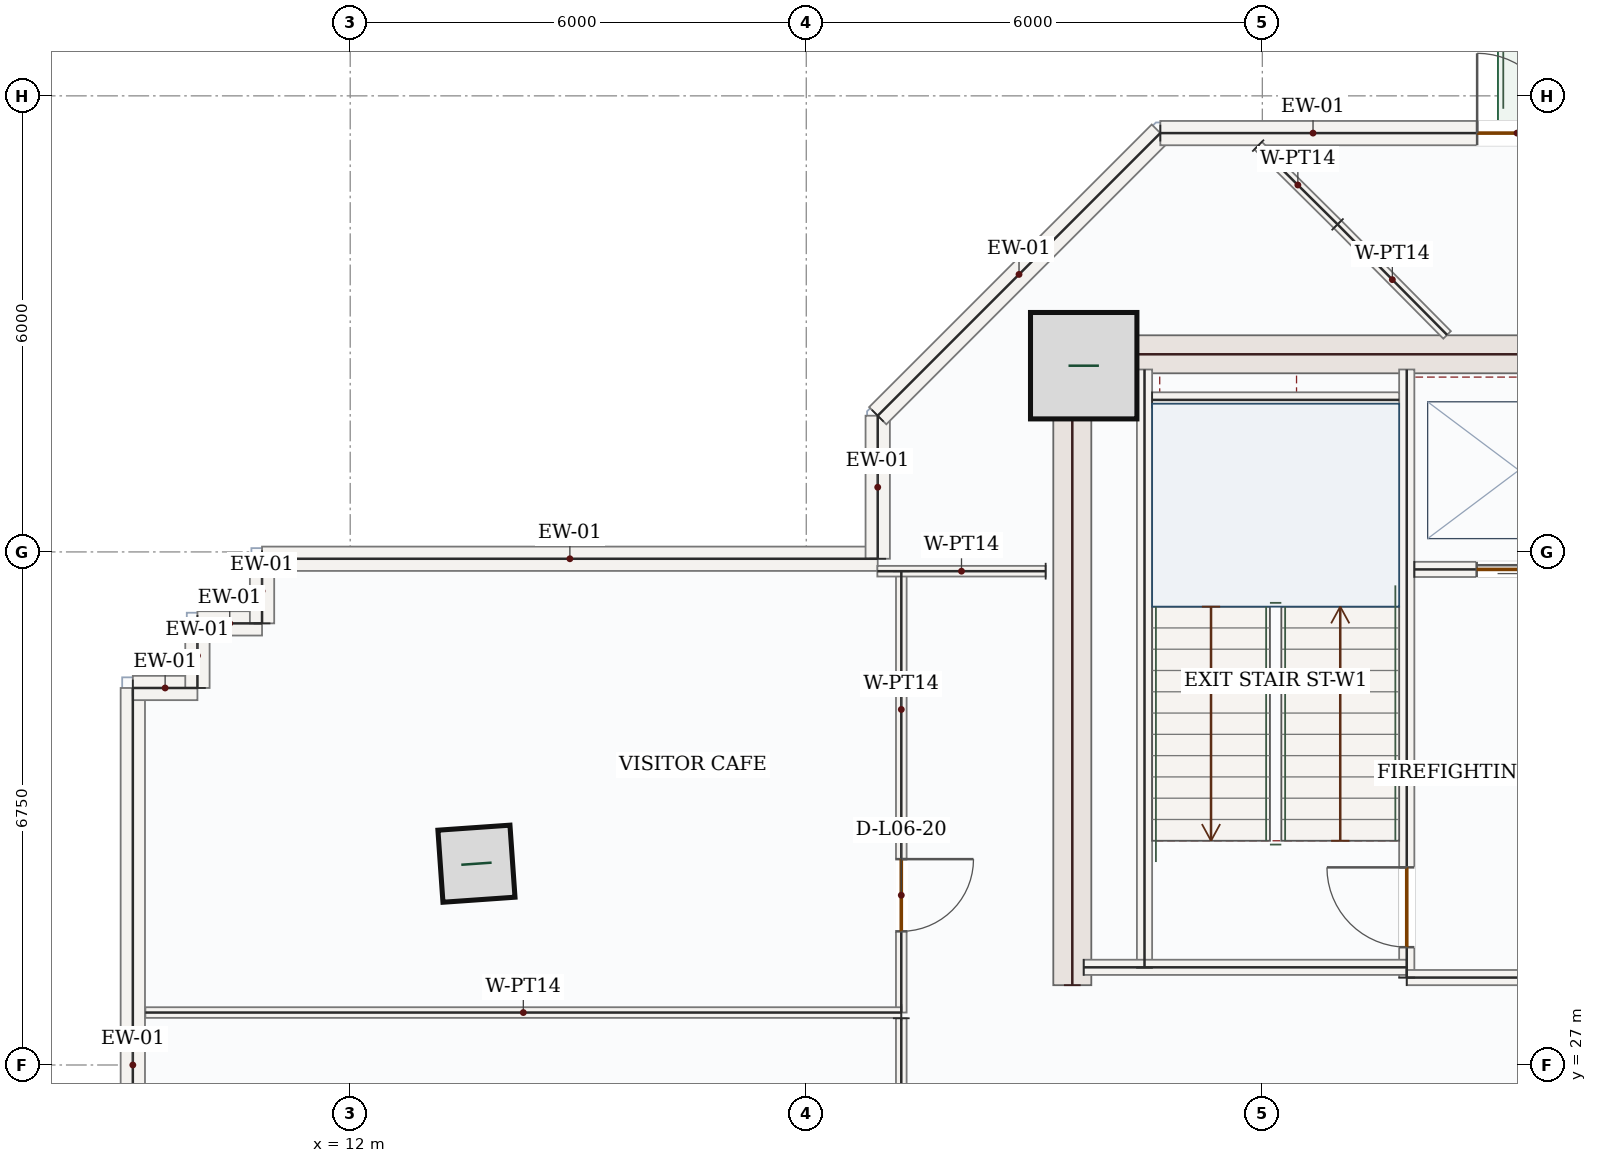
"""IFC4 building model, lengths in metres.
Left out: names, types, materials, properties, quantities, classifications, styles, units other than length and angle.
Written with IfcOpenShell. Run it as: python <this file> out.ifc"""

import sys

from ifc_helpers import new_model, si_unit, direction, frame, frame_2d, origin, origin_2d, place, context, subcontext, project, spatial, rectangle, hollow_rectangle, extrude, source, transform, mapped, element, fill, save


model = new_model("IFC4")
c1 = context("Model", 3, precision=1e-05, world=origin(), true_north=direction((0.0, 1.0)))
c2 = subcontext(c1, "Body", "Model", "MODEL_VIEW")
j1 = project(units=[si_unit("LENGTHUNIT", "METRE"), si_unit("PLANEANGLEUNIT", "RADIAN")], contexts=[c1])
p1 = place(None, origin())
s1 = spatial("IfcSite", under=j1, at=p1, CompositionType="ELEMENT")
p2 = place(p1, origin())
s2 = spatial("IfcBuilding", under=s1, at=p2, CompositionType="ELEMENT")
p3 = place(p2, frame((0.0, 0.0, 33.3)))
s3 = spatial("IfcBuildingStorey", under=s2, at=p3, CompositionType="ELEMENT", Elevation=33.3)
m1 = source(origin(), c2, "Body", "SweptSolid", [
    extrude(rectangle(XDim=8.55, YDim=0.5, at=frame_2d((4.275, 0.0))), origin(), (0.0, 0.0, 1.0), 3.95),
])
p4 = place(p3, frame((21.5, 28.05, 0.0), z_axis=(0.0, 0.0, 1.0), x_axis=(0.0, 1.0, 0.0)))
e1 = element("IfcWall", 1, at=p4, inside=s3, PredefinedType="SHEAR", context=c2, shape_type="MappedRepresentation", body=[
    mapped(m1, transform((0.0, 0.0, 0.0), x_axis=(1.0, 0.0, 0.0), y_axis=(0.0, 1.0, 0.0), z_axis=(0.0, 0.0, 1.0), scale=1.0)),
])
m2 = source(origin(), c2, "Body", "SweptSolid", [
    extrude(rectangle(XDim=7.0, YDim=0.5, at=frame_2d((3.5, 0.0))), origin(), (0.0, 0.0, 1.0), 3.95),
])
p5 = place(p3, frame((21.75, 36.35, 0.0), z_axis=(0.0, 0.0, 1.0), x_axis=(1.0, 0.0, 0.0)))
e2 = element("IfcWall", 2, at=p5, inside=s3, PredefinedType="SHEAR", context=c2, shape_type="MappedRepresentation", body=[
    mapped(m2, transform((0.0, 0.0, 0.0), x_axis=(1.0, 0.0, 0.0), y_axis=(0.0, 1.0, 0.0), z_axis=(0.0, 0.0, 1.0), scale=1.0)),
])
m3 = source(origin(), c2, "Body", "SweptSolid", [
    extrude(rectangle(XDim=1.4, YDim=1.4, at=origin_2d()), origin(), (0.0, 0.0, 1.0), 4.2),
])
p6 = place(p3, frame((21.65, 36.2, 0.0), z_axis=(0.0, 0.0, 1.0), x_axis=(1.0, 0.0, 0.0)))
e3 = element("IfcColumn", 3, at=p6, inside=s3, PredefinedType="COLUMN", context=c2, shape_type="MappedRepresentation", body=[
    mapped(m3, transform((0.0, 0.0, 0.0), x_axis=(1.0, 0.0, 0.0), y_axis=(0.0, 1.0, 0.0), z_axis=(0.0, 0.0, 1.0), scale=1.0)),
])
m4 = source(origin(), c2, "Body", "SweptSolid", [
    extrude(hollow_rectangle(XDim=0.95, YDim=0.95, WallThickness=0.05, at=origin_2d()), origin(), (0.0, 0.0, 1.0), 4.2),
])
p7 = place(p3, frame((13.661, 29.648, 0.0), z_axis=(0.0, 0.0, 1.0), x_axis=(0.99756405026, 0.069756473744, 0.0)))
e4 = element("IfcColumn", 4, at=p7, inside=s3, PredefinedType="COLUMN", context=c2, shape_type="MappedRepresentation", body=[
    mapped(m4, transform((0.0, 0.0, 0.0), x_axis=(1.0, 0.0, 0.0), y_axis=(0.0, 1.0, 0.0), z_axis=(0.0, 0.0, 1.0), scale=1.0)),
])
m5 = source(origin(), c2, "Body", "SweptSolid", [
    extrude(rectangle(XDim=9.92, YDim=0.32, at=frame_2d((4.96, 0.0))), origin(), (0.0, 0.0, 1.0), 3.95),
])
p8 = place(p3, frame((9.14, 22.04, 0.0), z_axis=(0.0, 0.0, 1.0), x_axis=(0.0, 1.0, 0.0)))
e5 = element("IfcWall", 5, at=p8, inside=s3, PredefinedType="SOLIDWALL", context=c2, shape_type="MappedRepresentation", body=[
    mapped(m5, transform((0.0, 0.0, 0.0), x_axis=(1.0, 0.0, 0.0), y_axis=(0.0, 1.0, 0.0), z_axis=(0.0, 0.0, 1.0), scale=1.0)),
])
m6 = source(origin(), c2, "Body", "SweptSolid", [
    extrude(rectangle(XDim=0.85, YDim=0.32, at=frame_2d((0.425, 0.0))), origin(), (0.0, 0.0, 1.0), 3.95),
])
for number, where, z_axis, x_axis in (
    (6, (9.14, 31.96, 0.0), (0.0, 0.0, 1.0), (1.0, 0.0, 0.0)),
    (7, (9.99, 31.96, 0.0), (0.0, 0.0, 1.0), (0.0, 1.0, 0.0)),
    (8, (9.99, 32.81, 0.0), (0.0, 0.0, 1.0), (1.0, 0.0, 0.0)),
):
    element("IfcWall", number, at=place(p3, frame(where, z_axis=z_axis, x_axis=x_axis)), inside=s3, PredefinedType="SOLIDWALL", context=c2, shape_type="MappedRepresentation", body=[
        mapped(m6, transform((0.0, 0.0, 0.0), x_axis=(1.0, 0.0, 0.0), y_axis=(0.0, 1.0, 0.0), z_axis=(0.0, 0.0, 1.0), scale=1.0)),
    ])
m7 = source(origin(), c2, "Body", "SweptSolid", [
    extrude(rectangle(XDim=0.85, YDim=0.32, at=frame_2d((0.425, 0.0))), origin(), (0.0, 0.0, 1.0), 3.95),
])
p9 = place(p3, frame((10.84, 32.81, 0.0), z_axis=(0.0, 0.0, 1.0), x_axis=(0.0, 1.0, 0.0)))
e9 = element("IfcWall", 9, at=p9, inside=s3, PredefinedType="SOLIDWALL", context=c2, shape_type="MappedRepresentation", body=[
    mapped(m7, transform((0.0, 0.0, 0.0), x_axis=(1.0, 0.0, 0.0), y_axis=(0.0, 1.0, 0.0), z_axis=(0.0, 0.0, 1.0), scale=1.0)),
])
m8 = source(origin(), c2, "Body", "SweptSolid", [
    extrude(rectangle(XDim=8.1, YDim=0.32, at=frame_2d((4.05, 0.0))), origin(), (0.0, 0.0, 1.0), 3.95),
])
p10 = place(p3, frame((10.84, 33.66, 0.0), z_axis=(0.0, 0.0, 1.0), x_axis=(1.0, 0.0, 0.0)))
e10 = element("IfcWall", 10, at=p10, inside=s3, PredefinedType="SOLIDWALL", context=c2, shape_type="MappedRepresentation", body=[
    mapped(m8, transform((0.0, 0.0, 0.0), x_axis=(1.0, 0.0, 0.0), y_axis=(0.0, 1.0, 0.0), z_axis=(0.0, 0.0, 1.0), scale=1.0)),
])
m9 = source(origin(), c2, "Body", "SweptSolid", [
    extrude(rectangle(XDim=1.882, YDim=0.32, at=frame_2d((0.941, 0.0))), origin(), (0.0, 0.0, 1.0), 3.95),
])
p11 = place(p3, frame((18.94, 33.66, 0.0), z_axis=(0.0, 0.0, 1.0), x_axis=(0.0, 1.0, 0.0)))
e11 = element("IfcWall", 11, at=p11, inside=s3, PredefinedType="SOLIDWALL", context=c2, shape_type="MappedRepresentation", body=[
    mapped(m9, transform((0.0, 0.0, 0.0), x_axis=(1.0, 0.0, 0.0), y_axis=(0.0, 1.0, 0.0), z_axis=(0.0, 0.0, 1.0), scale=1.0)),
])
m10 = source(origin(), c2, "Body", "SweptSolid", [
    extrude(rectangle(XDim=5.258, YDim=0.32, at=frame_2d((2.629, 0.0))), origin(), (0.0, 0.0, 1.0), 3.95),
])
p12 = place(p3, frame((18.94, 35.542, 0.0), z_axis=(0.0, 0.0, 1.0), x_axis=(0.707106781187, 0.707106781187, 0.0)))
e12 = element("IfcWall", 12, at=p12, inside=s3, PredefinedType="SOLIDWALL", context=c2, shape_type="MappedRepresentation", body=[
    mapped(m10, transform((0.0, 0.0, 0.0), x_axis=(1.0, 0.0, 0.0), y_axis=(0.0, 1.0, 0.0), z_axis=(0.0, 0.0, 1.0), scale=1.0)),
])
p13 = place(p3, frame((22.658, 39.26, 0.0), z_axis=(0.0, 0.0, 1.0), x_axis=(1.0, 0.0, 0.0)))
e13 = element("IfcWall", 13, at=p13, inside=s3, PredefinedType="SOLIDWALL", context=c2, shape_type="SweptSolid", body=[
    extrude(rectangle(XDim=6.682, YDim=0.32, at=frame_2d((3.341, 0.0))), origin(), (0.0, 0.0, 1.0), 3.95),
])
p14 = place(p13, frame((4.168, 0.0, 0.0)))
e14 = element("IfcOpeningElement", 14, at=p14, cuts=e13, PredefinedType="OPENING", context=c2, shape_type="SweptSolid", body=[
    extrude(rectangle(XDim=1.05, YDim=2.15, at=frame_2d((0.525, 1.075))), frame((0.0, 0.17, 0.0), z_axis=(0.0, -1.0, 0.0), x_axis=(1.0, 0.0, 0.0)), (0.0, 0.0, 1.0), 0.34),
])
m11 = source(origin(), c2, "Body", "SweptSolid", [
    extrude(rectangle(XDim=7.87, YDim=0.2, at=frame_2d((3.935, 0.0))), origin(), (0.0, 0.0, 1.0), 3.95),
])
p15 = place(p3, frame((22.45, 28.28, 0.0), z_axis=(0.0, 0.0, 1.0), x_axis=(0.0, 1.0, 0.0)))
e15 = element("IfcWall", 15, at=p15, inside=s3, PredefinedType="SOLIDWALL", context=c2, shape_type="MappedRepresentation", body=[
    mapped(m11, transform((0.0, 0.0, 0.0), x_axis=(1.0, 0.0, 0.0), y_axis=(0.0, 1.0, 0.0), z_axis=(0.0, 0.0, 1.0), scale=1.0)),
])
p16 = place(p3, frame((25.9, 28.15, 0.0), z_axis=(0.0, 0.0, 1.0), x_axis=(0.0, 1.0, 0.0)))
e16 = element("IfcWall", 16, at=p16, inside=s3, PredefinedType="SOLIDWALL", context=c2, shape_type="SweptSolid", body=[
    extrude(rectangle(XDim=8.0, YDim=0.2, at=frame_2d((4.0, 0.0))), origin(), (0.0, 0.0, 1.0), 3.95),
])
p17 = place(p16, frame((0.4, 0.0, 0.0)))
e17 = element("IfcOpeningElement", 17, at=p17, cuts=e16, PredefinedType="OPENING", context=c2, shape_type="SweptSolid", body=[
    extrude(rectangle(XDim=1.05, YDim=2.15, at=frame_2d((0.525, 1.075))), frame((0.0, 0.11, 0.0), z_axis=(0.0, -1.0, 0.0), x_axis=(1.0, 0.0, 0.0)), (0.0, 0.0, 1.0), 0.22),
])
m12 = source(origin(), c2, "Body", "SweptSolid", [
    extrude(rectangle(XDim=4.25, YDim=0.2, at=frame_2d((2.125, 0.0))), origin(), (0.0, 0.0, 1.0), 3.95),
])
p18 = place(p3, frame((21.65, 28.285, 0.0), z_axis=(0.0, 0.0, 1.0), x_axis=(1.0, 0.0, 0.0)))
e18 = element("IfcWall", 18, at=p18, inside=s3, PredefinedType="SOLIDWALL", context=c2, shape_type="MappedRepresentation", body=[
    mapped(m12, transform((0.0, 0.0, 0.0), x_axis=(1.0, 0.0, 0.0), y_axis=(0.0, 1.0, 0.0), z_axis=(0.0, 0.0, 1.0), scale=1.0)),
])
m13 = source(origin(), c2, "Body", "SweptSolid", [
    extrude(rectangle(XDim=3.0, YDim=0.2, at=frame_2d((1.5, 0.0))), origin(), (0.0, 0.0, 1.0), 3.95),
])
p19 = place(p3, frame((25.9, 28.15, 0.0), z_axis=(0.0, 0.0, 1.0), x_axis=(1.0, 0.0, 0.0)))
e19 = element("IfcWall", 19, at=p19, inside=s3, PredefinedType="SOLIDWALL", context=c2, shape_type="MappedRepresentation", body=[
    mapped(m13, transform((0.0, 0.0, 0.0), x_axis=(1.0, 0.0, 0.0), y_axis=(0.0, 1.0, 0.0), z_axis=(0.0, 0.0, 1.0), scale=1.0)),
])
m14 = source(origin(), c2, "Body", "SweptSolid", [
    extrude(rectangle(XDim=3.25, YDim=0.2, at=frame_2d((1.625, 0.0))), origin(), (0.0, 0.0, 1.0), 3.95),
])
p20 = place(p3, frame((22.55, 35.75, 0.0), z_axis=(0.0, 0.0, 1.0), x_axis=(1.0, 0.0, 0.0)))
e20 = element("IfcWall", 20, at=p20, inside=s3, PredefinedType="SOLIDWALL", context=c2, shape_type="MappedRepresentation", body=[
    mapped(m14, transform((0.0, 0.0, 0.0), x_axis=(1.0, 0.0, 0.0), y_axis=(0.0, 1.0, 0.0), z_axis=(0.0, 0.0, 1.0), scale=1.0)),
])
p21 = place(p3, frame((26.0, 33.52, 0.0), z_axis=(0.0, 0.0, 1.0), x_axis=(1.0, 0.0, 0.0)))
e21 = element("IfcWall", 21, at=p21, inside=s3, PredefinedType="SOLIDWALL", context=c2, shape_type="SweptSolid", body=[
    extrude(rectangle(XDim=2.75, YDim=0.2, at=frame_2d((1.375, 0.0))), origin(), (0.0, 0.0, 1.0), 3.95),
])
p22 = place(p21, frame((0.82, 0.0, 0.0)))
e22 = element("IfcOpeningElement", 22, at=p22, cuts=e21, PredefinedType="OPENING", context=c2, shape_type="SweptSolid", body=[
    extrude(rectangle(XDim=1.1, YDim=2.15, at=frame_2d((0.55, 1.075))), frame((0.0, 0.11, 0.0), z_axis=(0.0, -1.0, 0.0), x_axis=(1.0, 0.0, 0.0)), (0.0, 0.0, 1.0), 0.22),
])
p23 = place(p3, frame((19.25, 33.496, 0.0), z_axis=(0.0, 0.0, 1.0), x_axis=(-8.409368e-05, -0.999999996464, 0.0)))
e23 = element("IfcWall", 23, at=p23, inside=s3, PredefinedType="PARTITIONING", context=c2, shape_type="SweptSolid", body=[
    extrude(rectangle(XDim=5.806, YDim=0.14, at=frame_2d((2.903, 0.0))), origin(), (0.0, 0.0, 1.0), 3.95),
])
p24 = place(p23, frame((3.788, 0.0, 0.0)))
e24 = element("IfcOpeningElement", 24, at=p24, cuts=e23, PredefinedType="OPENING", context=c2, shape_type="SweptSolid", body=[
    extrude(rectangle(XDim=0.95, YDim=2.15, at=frame_2d((0.475, 1.075))), frame((0.0, 0.08, 0.0), z_axis=(0.0, -1.0, 0.0), x_axis=(1.0, 0.0, 0.0)), (0.0, 0.0, 1.0), 0.16),
])
m15 = source(origin(), c2, "Body", "SweptSolid", [
    extrude(rectangle(XDim=9.945, YDim=0.14, at=frame_2d((4.973, 0.0))), origin(), (0.0, 0.0, 1.0), 3.95),
])
p25 = place(p3, frame((19.25, 27.69, 0.0), z_axis=(0.0, 0.0, 1.0), x_axis=(-1.0, 0.0, 0.0)))
e25 = element("IfcWall", 25, at=p25, inside=s3, PredefinedType="PARTITIONING", context=c2, shape_type="MappedRepresentation", body=[
    mapped(m15, transform((0.0, 0.0, 0.0), x_axis=(1.0, 0.0, 0.0), y_axis=(0.0, 1.0, 0.0), z_axis=(0.0, 0.0, 1.0), scale=1.0)),
])
m16 = source(origin(), c2, "Body", "SweptSolid", [
    extrude(rectangle(XDim=1.471, YDim=0.14, at=frame_2d((0.736, 0.0))), origin(), (0.0, 0.0, 1.0), 3.95),
])
p26 = place(p3, frame((23.945, 39.095, 0.0), z_axis=(0.0, 0.0, 1.0), x_axis=(0.710417151562, -0.703780840011, 0.0)))
e26 = element("IfcWall", 26, at=p26, inside=s3, PredefinedType="PARTITIONING", context=c2, shape_type="MappedRepresentation", body=[
    mapped(m16, transform((0.0, 0.0, 0.0), x_axis=(1.0, 0.0, 0.0), y_axis=(0.0, 1.0, 0.0), z_axis=(0.0, 0.0, 1.0), scale=1.0)),
])
m17 = source(origin(), c2, "Body", "SweptSolid", [
    extrude(rectangle(XDim=2.047, YDim=0.14, at=frame_2d((1.024, 0.0))), origin(), (0.0, 0.0, 1.0), 3.95),
])
p27 = place(p3, frame((24.99, 38.059, 0.0), z_axis=(0.0, 0.0, 1.0), x_axis=(0.703819772346, -0.710378580797, 0.0)))
e27 = element("IfcWall", 27, at=p27, inside=s3, PredefinedType="PARTITIONING", context=c2, shape_type="MappedRepresentation", body=[
    mapped(m17, transform((0.0, 0.0, 0.0), x_axis=(1.0, 0.0, 0.0), y_axis=(0.0, 1.0, 0.0), z_axis=(0.0, 0.0, 1.0), scale=1.0)),
])
m18 = source(origin(), c2, "Body", "SweptSolid", [
    extrude(rectangle(XDim=2.214, YDim=0.14, at=frame_2d((1.107, 0.0))), origin(), (0.0, 0.0, 1.0), 3.95),
])
p28 = place(p3, frame((21.149, 33.497, 0.0), z_axis=(0.0, 0.0, 1.0), x_axis=(-0.999999993922, -0.000110253583, 0.0)))
e28 = element("IfcWall", 28, at=p28, inside=s3, PredefinedType="PARTITIONING", context=c2, shape_type="MappedRepresentation", body=[
    mapped(m18, transform((0.0, 0.0, 0.0), x_axis=(1.0, 0.0, 0.0), y_axis=(0.0, 1.0, 0.0), z_axis=(0.0, 0.0, 1.0), scale=1.0)),
])
p29 = place(p3, frame((19.25, 27.615, 0.0), z_axis=(0.0, 0.0, 1.0), x_axis=(0.0, -1.0, 0.0)))
e29 = element("IfcWall", 29, at=p29, inside=s3, PredefinedType="PARTITIONING", context=c2, shape_type="SweptSolid", body=[
    extrude(rectangle(XDim=7.109, YDim=0.14, at=frame_2d((3.555, 0.0))), origin(), (0.0, 0.0, 1.0), 3.95),
])
p30 = place(p29, frame((2.156, 0.0, 0.0)))
e30 = element("IfcOpeningElement", 30, at=p30, cuts=e29, PredefinedType="OPENING", context=c2, shape_type="SweptSolid", body=[
    extrude(rectangle(XDim=0.95, YDim=2.15, at=frame_2d((0.475, 1.075))), frame((0.0, 0.08, 0.0), z_axis=(0.0, -1.0, 0.0), x_axis=(1.0, 0.0, 0.0)), (0.0, 0.0, 1.0), 0.16),
])
m19 = source(origin(), c2, "Body", "SweptSolid", [
    extrude(rectangle(XDim=1.05, YDim=2.15, at=frame_2d((0.525, 1.075))), frame((0.0, 0.025, 0.0), z_axis=(0.0, -1.0, 0.0), x_axis=(1.0, 0.0, 0.0)), (0.0, 0.0, 1.0), 0.05),
])
p31 = place(p14, origin())
e31 = element("IfcDoor", 31, at=p31, inside=s3, OperationType="SINGLE_SWING_LEFT", PredefinedType="DOOR", context=c2, shape_type="MappedRepresentation", body=[
    mapped(m19, transform((0.0, 0.0, 0.0), x_axis=(1.0, 0.0, 0.0), y_axis=(0.0, 1.0, 0.0), z_axis=(0.0, 0.0, 1.0), scale=1.0)),
])
fill(e14, e31)
p32 = place(p17, origin())
e32 = element("IfcDoor", 32, at=p32, inside=s3, OperationType="SINGLE_SWING_RIGHT", PredefinedType="DOOR", context=c2, shape_type="MappedRepresentation", body=[
    mapped(m19, transform((0.0, 0.0, 0.0), x_axis=(1.0, 0.0, 0.0), y_axis=(0.0, 1.0, 0.0), z_axis=(0.0, 0.0, 1.0), scale=1.0)),
])
fill(e17, e32)
m20 = source(origin(), c2, "Body", "SweptSolid", [
    extrude(rectangle(XDim=1.1, YDim=2.15, at=frame_2d((0.55, 1.075))), frame((0.0, 0.025, 0.0), z_axis=(0.0, -1.0, 0.0), x_axis=(1.0, 0.0, 0.0)), (0.0, 0.0, 1.0), 0.05),
])
p33 = place(p22, origin())
e33 = element("IfcDoor", 33, at=p33, inside=s3, OperationType="DOUBLE_DOOR_SLIDING", PredefinedType="DOOR", context=c2, shape_type="MappedRepresentation", body=[
    mapped(m20, transform((0.0, 0.0, 0.0), x_axis=(1.0, 0.0, 0.0), y_axis=(0.0, 1.0, 0.0), z_axis=(0.0, 0.0, 1.0), scale=1.0)),
])
fill(e22, e33)
m21 = source(origin(), c2, "Body", "SweptSolid", [
    extrude(rectangle(XDim=0.95, YDim=2.15, at=frame_2d((0.475, 1.075))), frame((0.0, 0.025, 0.0), z_axis=(0.0, -1.0, 0.0), x_axis=(1.0, 0.0, 0.0)), (0.0, 0.0, 1.0), 0.05),
])
p34 = place(p24, origin())
e34 = element("IfcDoor", 34, at=p34, inside=s3, OperationType="SINGLE_SWING_LEFT", PredefinedType="DOOR", context=c2, shape_type="MappedRepresentation", body=[
    mapped(m21, transform((0.0, 0.0, 0.0), x_axis=(1.0, 0.0, 0.0), y_axis=(0.0, 1.0, 0.0), z_axis=(0.0, 0.0, 1.0), scale=1.0)),
])
fill(e24, e34)
save(model, sys.argv[1])
